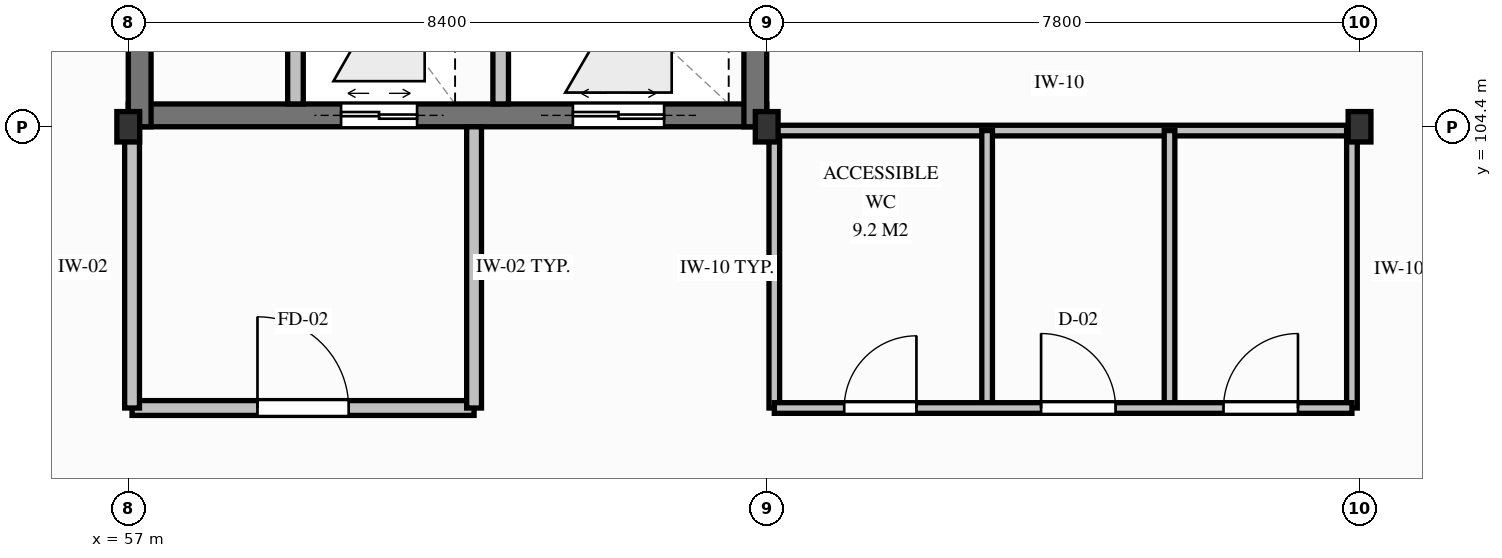
"""IFC4 building model, lengths in metres.
Left out: names, types, materials, properties, quantities, classifications, styles, units other than length and angle.
Written with IfcOpenShell. Run it as: python <this file> out.ifc"""

import sys

from ifc_helpers import new_model, si_unit, direction, frame, frame_2d, origin, origin_2d, place, context, subcontext, project, spatial, rectangle, i_section, extrude, element, fill, save


model = new_model("IFC4")
c1 = context("Model", 3, precision=1e-05, world=origin(), true_north=direction((0.0, 1.0)))
c2 = subcontext(c1, "Body", "Model", "MODEL_VIEW")
j1 = project(units=[si_unit("LENGTHUNIT", "METRE"), si_unit("PLANEANGLEUNIT", "RADIAN")], contexts=[c1])
p1 = place(None, origin())
s1 = spatial("IfcSite", under=j1, at=p1, CompositionType="ELEMENT")
p2 = place(p1, origin())
s2 = spatial("IfcBuilding", under=s1, at=p2, CompositionType="ELEMENT")
p3 = place(p2, frame((0.0, 0.0, 17.25)))
s3 = spatial("IfcBuildingStorey", under=s2, at=p3, CompositionType="ELEMENT", Elevation=17.25)
p4 = place(p3, frame((57.0, 104.55, 0.0), z_axis=(0.0, 0.0, 1.0), x_axis=(1.0, 0.0, 0.0)))
e1 = element("IfcWall", 1, at=p4, inside=s3, PredefinedType="SHEAR", context=c2, shape_type="SweptSolid", body=[
    extrude(rectangle(XDim=8.4, YDim=0.3, at=frame_2d((4.2, 0.0))), origin(), (0.0, 0.0, 1.0), 4.05),
])
p5 = place(p4, frame((2.8, 0.0, 0.0)))
e2 = element("IfcOpeningElement", 2, at=p5, cuts=e1, PredefinedType="OPENING", context=c2, shape_type="SweptSolid", body=[
    extrude(rectangle(XDim=1.0, YDim=2.1, at=frame_2d((0.5, 1.05))), frame((0.0, 0.16, 0.0), z_axis=(0.0, -1.0, 0.0), x_axis=(1.0, 0.0, 0.0)), (0.0, 0.0, 1.0), 0.32),
])
p6 = place(p4, frame((5.85, 0.0, 0.0)))
e3 = element("IfcOpeningElement", 3, at=p6, cuts=e1, PredefinedType="OPENING", context=c2, shape_type="SweptSolid", body=[
    extrude(rectangle(XDim=1.2, YDim=2.15, at=frame_2d((0.6, 1.075))), frame((0.0, 0.16, 0.0), z_axis=(0.0, -1.0, 0.0), x_axis=(1.0, 0.0, 0.0)), (0.0, 0.0, 1.0), 0.32),
])
p7 = place(p3, frame((57.15, 104.4, 0.0), z_axis=(0.0, 0.0, 1.0), x_axis=(0.0, 1.0, 0.0)))
e4 = element("IfcWall", 4, at=p7, inside=s3, PredefinedType="SHEAR", context=c2, shape_type="SweptSolid", body=[
    extrude(rectangle(XDim=7.2, YDim=0.3, at=frame_2d((3.6, 0.0))), origin(), (0.0, 0.0, 1.0), 4.05),
])
p8 = place(p7, frame((4.2, 0.0, 0.0)))
e5 = element("IfcOpeningElement", 5, at=p8, cuts=e4, PredefinedType="OPENING", context=c2, shape_type="SweptSolid", body=[
    extrude(rectangle(XDim=1.1, YDim=2.15, at=frame_2d((0.55, 1.075))), frame((0.0, 0.16, 0.0), z_axis=(0.0, -1.0, 0.0), x_axis=(1.0, 0.0, 0.0)), (0.0, 0.0, 1.0), 0.32),
])
p9 = place(p3, frame((65.25, 104.4, 0.0), z_axis=(0.0, 0.0, 1.0), x_axis=(0.0, 1.0, 0.0)))
e6 = element("IfcWall", 6, at=p9, inside=s3, PredefinedType="SHEAR", context=c2, shape_type="SweptSolid", body=[
    extrude(rectangle(XDim=7.2, YDim=0.3, at=frame_2d((3.6, 0.0))), origin(), (0.0, 0.0, 1.0), 4.05),
])
for number, where, z_axis, x_axis in (
    (7, (57.0, 104.4, 0.0), (0.0, 0.0, 1.0), (1.0, 0.0, 0.0)),
    (8, (65.4, 104.4, 0.0), (0.0, 0.0, 1.0), (1.0, 0.0, 0.0)),
    (9, (73.2, 104.4, 0.0), (0.0, 0.0, 1.0), (1.0, 0.0, 0.0)),
):
    element("IfcColumn", number, at=place(p3, frame(where, z_axis=z_axis, x_axis=x_axis)), inside=s3, PredefinedType="COLUMN", context=c2, shape_type="SweptSolid", body=[
        extrude(i_section(OverallWidth=0.3, OverallDepth=0.4, WebThickness=0.013, FlangeThickness=0.024, FilletRadius=0.027, at=origin_2d()), origin(), (0.0, 0.0, 1.0), 4.05),
    ])
for number, where, z_axis, x_axis in (
    (10, (59.2, 104.7, 0.0), (0.0, 0.0, 1.0), (0.0, 1.0, 0.0)),
    (11, (61.9, 104.7, 0.0), (0.0, 0.0, 1.0), (0.0, 1.0, 0.0)),
):
    element("IfcWall", number, at=place(p3, frame(where, z_axis=z_axis, x_axis=x_axis)), inside=s3, PredefinedType="PARTITIONING", context=c2, shape_type="SweptSolid", body=[
        extrude(rectangle(XDim=2.7, YDim=0.205, at=frame_2d((1.35, 0.0))), origin(), (0.0, 0.0, 1.0), 3.388),
    ])
p10 = place(p3, frame((65.5, 100.7, 0.0), z_axis=(0.0, 0.0, 1.0), x_axis=(0.0, 1.0, 0.0)))
e12 = element("IfcWall", 12, at=p10, inside=s3, PredefinedType="PARTITIONING", context=c2, shape_type="SweptSolid", body=[
    extrude(rectangle(XDim=3.68, YDim=0.14, at=frame_2d((1.84, 0.0))), origin(), (0.0, 0.0, 1.0), 3.178),
])
p11 = place(p3, frame((65.4, 104.35, 0.0), z_axis=(0.0, 0.0, 1.0), x_axis=(1.0, 0.0, 0.0)))
e13 = element("IfcWall", 13, at=p11, inside=s3, PredefinedType="PARTITIONING", context=c2, shape_type="SweptSolid", body=[
    extrude(rectangle(XDim=7.7, YDim=0.14, at=frame_2d((3.85, 0.0))), origin(), (0.0, 0.0, 1.0), 3.178),
])
p12 = place(p3, frame((73.1, 100.7, 0.0), z_axis=(0.0, 0.0, 1.0), x_axis=(0.0, 1.0, 0.0)))
e14 = element("IfcWall", 14, at=p12, inside=s3, PredefinedType="PARTITIONING", context=c2, shape_type="SweptSolid", body=[
    extrude(rectangle(XDim=3.65, YDim=0.14, at=frame_2d((1.825, 0.0))), origin(), (0.0, 0.0, 1.0), 3.368),
])
for number, where, z_axis, x_axis in (
    (15, (68.3, 100.7, 0.0), (0.0, 0.0, 1.0), (0.0, 1.0, 0.0)),
    (16, (70.7, 100.7, 0.0), (0.0, 0.0, 1.0), (0.0, 1.0, 0.0)),
):
    element("IfcWall", number, at=place(p3, frame(where, z_axis=z_axis, x_axis=x_axis)), inside=s3, PredefinedType="PARTITIONING", context=c2, shape_type="SweptSolid", body=[
        extrude(rectangle(XDim=3.65, YDim=0.14, at=frame_2d((1.825, 0.0))), origin(), (0.0, 0.0, 1.0), 3.448),
    ])
p13 = place(p3, frame((65.5, 100.7, 0.0), z_axis=(0.0, 0.0, 1.0), x_axis=(1.0, 0.0, 0.0)))
e17 = element("IfcWall", 17, at=p13, inside=s3, PredefinedType="PARTITIONING", context=c2, shape_type="SweptSolid", body=[
    extrude(rectangle(XDim=7.6, YDim=0.14, at=frame_2d((3.8, 0.0))), origin(), (0.0, 0.0, 1.0), 3.218),
])
p14 = place(p13, frame((0.92, 0.0, 0.0)))
e18 = element("IfcOpeningElement", 18, at=p14, cuts=e17, PredefinedType="OPENING", context=c2, shape_type="SweptSolid", body=[
    extrude(rectangle(XDim=0.95, YDim=2.12, at=frame_2d((0.475, 1.06))), frame((0.0, 0.08, 0.0), z_axis=(0.0, -1.0, 0.0), x_axis=(1.0, 0.0, 0.0)), (0.0, 0.0, 1.0), 0.16),
])
p15 = place(p13, frame((3.51, 0.0, 0.0)))
e19 = element("IfcOpeningElement", 19, at=p15, cuts=e17, PredefinedType="OPENING", context=c2, shape_type="SweptSolid", body=[
    extrude(rectangle(XDim=0.98, YDim=2.14, at=frame_2d((0.49, 1.07))), frame((0.0, 0.08, 0.0), z_axis=(0.0, -1.0, 0.0), x_axis=(1.0, 0.0, 0.0)), (0.0, 0.0, 1.0), 0.16),
])
p16 = place(p13, frame((5.91, 0.0, 0.0)))
e20 = element("IfcOpeningElement", 20, at=p16, cuts=e17, PredefinedType="OPENING", context=c2, shape_type="SweptSolid", body=[
    extrude(rectangle(XDim=0.98, YDim=2.14, at=frame_2d((0.49, 1.07))), frame((0.0, 0.08, 0.0), z_axis=(0.0, -1.0, 0.0), x_axis=(1.0, 0.0, 0.0)), (0.0, 0.0, 1.0), 0.16),
])
p17 = place(p3, frame((57.05, 100.7, 0.0), z_axis=(0.0, 0.0, 1.0), x_axis=(1.0, 0.0, 0.0)))
e21 = element("IfcWall", 21, at=p17, inside=s3, PredefinedType="PARTITIONING", context=c2, shape_type="SweptSolid", body=[
    extrude(rectangle(XDim=4.5, YDim=0.195, at=frame_2d((2.25, 0.0))), origin(), (0.0, 0.0, 1.0), 3.468),
])
p18 = place(p17, frame((1.65, 0.0, 0.0)))
e22 = element("IfcOpeningElement", 22, at=p18, cuts=e21, PredefinedType="OPENING", context=c2, shape_type="SweptSolid", body=[
    extrude(rectangle(XDim=1.2, YDim=2.15, at=frame_2d((0.6, 1.075))), frame((0.0, 0.107, 0.0), z_axis=(0.0, -1.0, 0.0), x_axis=(1.0, 0.0, 0.0)), (0.0, 0.0, 1.0), 0.215),
])
p19 = place(p3, frame((61.55, 100.7, 0.0), z_axis=(0.0, 0.0, 1.0), x_axis=(0.0, 1.0, 0.0)))
e23 = element("IfcWall", 23, at=p19, inside=s3, PredefinedType="PARTITIONING", context=c2, shape_type="SweptSolid", body=[
    extrude(rectangle(XDim=3.7, YDim=0.195, at=frame_2d((1.85, 0.0))), origin(), (0.0, 0.0, 1.0), 3.388),
])
p20 = place(p3, frame((57.05, 100.7, 0.0), z_axis=(0.0, 0.0, 1.0), x_axis=(0.0, 1.0, 0.0)))
e24 = element("IfcWall", 24, at=p20, inside=s3, PredefinedType="PARTITIONING", context=c2, shape_type="SweptSolid", body=[
    extrude(rectangle(XDim=3.7, YDim=0.195, at=frame_2d((1.85, 0.0))), origin(), (0.0, 0.0, 1.0), 3.338),
])
p21 = place(p5, origin())
e25 = element("IfcDoor", 25, at=p21, inside=s3, OperationType="DOUBLE_DOOR_SLIDING", PredefinedType="DOOR", context=c2, shape_type="SweptSolid", body=[
    extrude(rectangle(XDim=1.0, YDim=2.1, at=frame_2d((0.5, 1.05))), frame((0.0, 0.025, 0.0), z_axis=(0.0, -1.0, 0.0), x_axis=(1.0, 0.0, 0.0)), (0.0, 0.0, 1.0), 0.05),
])
fill(e2, e25)
p22 = place(p6, origin())
e26 = element("IfcDoor", 26, at=p22, inside=s3, OperationType="DOUBLE_DOOR_SLIDING", PredefinedType="DOOR", context=c2, shape_type="SweptSolid", body=[
    extrude(rectangle(XDim=1.2, YDim=2.15, at=frame_2d((0.6, 1.075))), frame((0.0, 0.025, 0.0), z_axis=(0.0, -1.0, 0.0), x_axis=(1.0, 0.0, 0.0)), (0.0, 0.0, 1.0), 0.05),
])
fill(e3, e26)
p23 = place(p14, origin())
e27 = element("IfcDoor", 27, at=p23, inside=s3, OperationType="SINGLE_SWING_RIGHT", PredefinedType="DOOR", context=c2, shape_type="SweptSolid", body=[
    extrude(rectangle(XDim=0.95, YDim=2.12, at=frame_2d((0.475, 1.06))), frame((0.0, 0.025, 0.0), z_axis=(0.0, -1.0, 0.0), x_axis=(1.0, 0.0, 0.0)), (0.0, 0.0, 1.0), 0.05),
])
fill(e18, e27)
p24 = place(p15, origin())
e28 = element("IfcDoor", 28, at=p24, inside=s3, OperationType="SINGLE_SWING_LEFT", PredefinedType="DOOR", context=c2, shape_type="SweptSolid", body=[
    extrude(rectangle(XDim=0.98, YDim=2.14, at=frame_2d((0.49, 1.07))), frame((0.0, 0.025, 0.0), z_axis=(0.0, -1.0, 0.0), x_axis=(1.0, 0.0, 0.0)), (0.0, 0.0, 1.0), 0.05),
])
fill(e19, e28)
p25 = place(p16, origin())
e29 = element("IfcDoor", 29, at=p25, inside=s3, OperationType="SINGLE_SWING_RIGHT", PredefinedType="DOOR", context=c2, shape_type="SweptSolid", body=[
    extrude(rectangle(XDim=0.98, YDim=2.14, at=frame_2d((0.49, 1.07))), frame((0.0, 0.025, 0.0), z_axis=(0.0, -1.0, 0.0), x_axis=(1.0, 0.0, 0.0)), (0.0, 0.0, 1.0), 0.05),
])
fill(e20, e29)
p26 = place(p18, origin())
e30 = element("IfcDoor", 30, at=p26, inside=s3, OperationType="SINGLE_SWING_LEFT", PredefinedType="DOOR", context=c2, shape_type="SweptSolid", body=[
    extrude(rectangle(XDim=1.2, YDim=2.15, at=frame_2d((0.6, 1.075))), frame((0.0, 0.025, 0.0), z_axis=(0.0, -1.0, 0.0), x_axis=(1.0, 0.0, 0.0)), (0.0, 0.0, 1.0), 0.05),
])
fill(e22, e30)
save(model, sys.argv[1])
